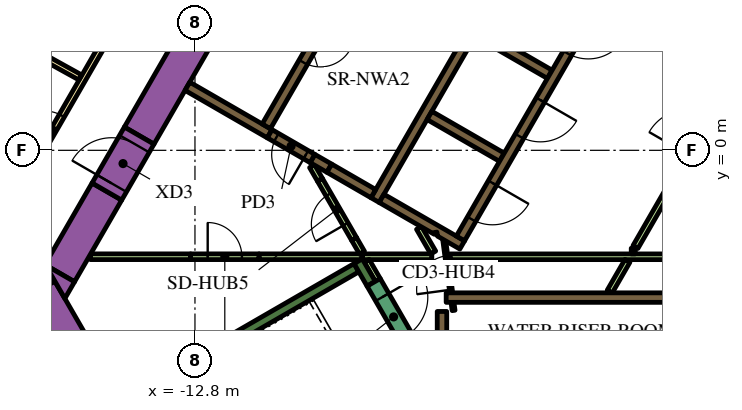
"""IFC4 building model, lengths in metres.
Left out: names, types, materials, properties, quantities, classifications, styles, units other than length and angle.
Written with IfcOpenShell. Run it as: python <this file> out.ifc"""

import sys

from ifc_helpers import new_model, si_unit, direction, frame, frame_2d, origin, place, context, subcontext, project, spatial, polyline, rectangle, outline, extrude, element, fill, save


model = new_model("IFC4")
c1 = context("Model", 3, precision=1e-05, world=origin(), true_north=direction((0.0, 1.0)))
c2 = subcontext(c1, "Body", "Model", "MODEL_VIEW")
j1 = project(units=[si_unit("LENGTHUNIT", "METRE"), si_unit("PLANEANGLEUNIT", "RADIAN")], contexts=[c1])
p1 = place(None, origin())
s1 = spatial("IfcSite", under=j1, at=p1, CompositionType="ELEMENT")
p2 = place(p1, origin())
s2 = spatial("IfcBuilding", under=s1, at=p2, CompositionType="ELEMENT")
p3 = place(p2, frame((0.0, 0.0, 62.7)))
s3 = spatial("IfcBuildingStorey", under=s2, at=p3, CompositionType="ELEMENT", Elevation=62.7)
p4 = place(p3, frame((-14.268, 0.387, 0.0), z_axis=(0.0, 0.0, 1.0), x_axis=(0.499994617707, 0.866028511231, 0.0)))
e1 = element("IfcWall", 1, at=p4, inside=s3, PredefinedType="SOLIDWALL", context=c2, shape_type="SweptSolid", body=[
    extrude(rectangle(XDim=18.817, YDim=0.9, at=frame_2d((9.409, 0.0))), origin(), (0.0, 0.0, 1.0), 3.9),
])
p5 = place(p3, frame((-12.134, -11.883, 0.0), z_axis=(0.0, 0.0, 1.0), x_axis=(-0.500005339912, 0.866022320763, 0.0)))
e2 = element("IfcWall", 2, at=p5, inside=s3, PredefinedType="SOLIDWALL", context=c2, shape_type="SweptSolid", body=[
    extrude(rectangle(XDim=9.488, YDim=0.9, at=frame_2d((4.744, 0.0))), origin(), (0.0, 0.0, 1.0), 3.9),
])
p6 = place(p3, origin())
e3 = element("IfcWall", 3, at=p6, inside=s3, PredefinedType="SOLIDWALL", context=c2, shape_type="SweptSolid", body=[
    extrude(outline(polyline([(-16.489, -3.44), (-17.251, -3.88), (-16.743, -3.0), (-16.489, -3.44)])), origin(), (0.0, 0.0, 1.0), 3.9),
])
p7 = place(p3, frame((-15.118, -1.085, 0.0), z_axis=(0.0, 0.0, 1.0), x_axis=(-0.50006606081, -0.865987260198, 0.0)))
e4 = element("IfcWall", 4, at=p7, inside=s3, PredefinedType="SOLIDWALL", context=c2, shape_type="SweptSolid", body=[
    extrude(rectangle(XDim=2.481, YDim=0.9, at=frame_2d((1.24, 0.0))), origin(), (0.0, 0.0, 1.0), 3.9),
])
e5 = element("IfcWall", 5, at=p6, inside=s3, PredefinedType="SOLIDWALL", context=c2, shape_type="SweptSolid", body=[
    extrude(outline(polyline([(-16.223, -3.9), (-16.732, -3.02), (-15.969, -3.46), (-16.223, -3.9)])), origin(), (0.0, 0.0, 1.0), 3.9),
])
p8 = place(p3, frame((-14.44, -6.49, 0.0), z_axis=(0.0, 0.0, 1.0), x_axis=(0.866022966069, 0.500004222222, 0.0)))
e6 = element("IfcWall", 6, at=p8, inside=s3, PredefinedType="SOLIDWALL", context=c2, shape_type="SweptSolid", body=[
    extrude(rectangle(XDim=6.8, YDim=0.25, at=frame_2d((3.4, 0.0))), origin(), (0.0, 0.0, 1.0), 3.9),
])
p9 = place(p3, frame((-8.163, -3.511, 0.0), z_axis=(0.0, 0.0, 1.0), x_axis=(-0.500206266495, 0.865906283012, 0.0)))
e7 = element("IfcWall", 7, at=p9, inside=s3, PredefinedType="SOLIDWALL", context=c2, shape_type="SweptSolid", body=[
    extrude(rectangle(XDim=0.684, YDim=0.25, at=frame_2d((0.342, 0.0))), origin(), (0.0, 0.0, 1.0), 3.9),
])
p10 = place(p3, frame((-6.3, -4.24, 0.0), z_axis=(0.0, 0.0, 1.0), x_axis=(0.0, -1.0, 0.0)))
e8 = element("IfcWall", 8, at=p10, inside=s3, PredefinedType="SOLIDWALL", context=c2, shape_type="SweptSolid", body=[
    extrude(rectangle(XDim=2.914, YDim=0.25, at=frame_2d((1.457, 0.0))), origin(), (0.0, 0.0, 1.0), 3.9),
])
p11 = place(p3, frame((-6.19, -3.875, 0.0), z_axis=(0.0, 0.0, 1.0), x_axis=(1.0, 0.0, 0.0)))
e9 = element("IfcWall", 9, at=p11, inside=s3, PredefinedType="SOLIDWALL", context=c2, shape_type="SweptSolid", body=[
    extrude(rectangle(XDim=12.615, YDim=0.25, at=frame_2d((6.307, 0.0))), origin(), (0.0, 0.0, 1.0), 3.9),
])
p12 = place(p3, frame((-8.06, -1.311, 0.0), z_axis=(0.0, 0.0, 1.0), x_axis=(0.50000273126, 0.866023826885, 0.0)))
e10 = element("IfcWall", 10, at=p12, inside=s3, PredefinedType="SOLIDWALL", context=c2, shape_type="SweptSolid", body=[
    extrude(rectangle(XDim=10.33, YDim=0.25, at=frame_2d((5.165, 0.0))), origin(), (0.0, 0.0, 1.0), 3.9),
])
for number, where, z_axis, x_axis in (
    (11, (-5.369, 3.1, 0.0), (0.0, 0.0, 1.0), (0.866, -0.5, 0.0)),
    (12, (-4.724, -0.182, 0.0), (0.0, 0.0, 1.0), (-0.866, 0.5, 0.0)),
):
    element("IfcWall", number, at=place(p3, frame(where, z_axis=z_axis, x_axis=x_axis)), inside=s3, PredefinedType="SOLIDWALL", context=c2, shape_type="SweptSolid", body=[
        extrude(rectangle(XDim=2.2, YDim=0.25, at=frame_2d((1.1, 0.0))), origin(), (0.0, 0.0, 1.0), 3.9),
    ])
e13 = element("IfcWall", 13, at=p6, inside=s3, PredefinedType="SOLIDWALL", context=c2, shape_type="SweptSolid", body=[
    extrude(outline(polyline([(-5.922, -2.257), (-5.922, -2.257), (-5.705, -2.382), (-5.83, -2.598), (-6.418, -2.258), (-6.433, -2.153), (-6.433, -2.153), (-6.433, -2.153), (-6.508, -2.163), (-6.508, -2.163), (-6.508, -2.163), (-6.501, -2.21), (-7.952, -1.373), (-7.827, -1.156), (-5.922, -2.257)])), origin(), (0.0, 0.0, 1.0), 3.9),
])
p13 = place(p3, frame((-9.708, -0.215, 0.0), z_axis=(0.0, 0.0, 1.0), x_axis=(0.866113839764, -0.499846793097, 0.0)))
e14 = element("IfcWall", 14, at=p13, inside=s3, PredefinedType="SOLIDWALL", context=c2, shape_type="SweptSolid", body=[
    extrude(rectangle(XDim=0.51, YDim=0.25, at=frame_2d((0.255, 0.0))), origin(), (0.0, 0.0, 1.0), 3.9),
])
p14 = place(p3, frame((-12.999, 1.685, 0.0), z_axis=(0.0, 0.0, 1.0), x_axis=(0.865996765544, -0.500049599607, 0.0)))
e15 = element("IfcWall", 15, at=p14, inside=s3, PredefinedType="SOLIDWALL", context=c2, shape_type="SweptSolid", body=[
    extrude(rectangle(XDim=2.498, YDim=0.25, at=frame_2d((1.249, 0.0))), origin(), (0.0, 0.0, 1.0), 3.9),
])
p15 = place(p3, frame((-9.265, -0.471, 0.0), z_axis=(0.0, 0.0, 1.0), x_axis=(0.865954634268, -0.500122556369, 0.0)))
e16 = element("IfcWall", 16, at=p15, inside=s3, PredefinedType="SOLIDWALL", context=c2, shape_type="SweptSolid", body=[
    extrude(rectangle(XDim=1.338, YDim=0.25, at=frame_2d((0.669, 0.0))), origin(), (0.0, 0.0, 1.0), 3.9),
])
p16 = place(p3, frame((-12.915, -2.8, 0.0), z_axis=(0.0, 0.0, 1.0), x_axis=(-1.0, 0.0, 0.0)))
e17 = element("IfcWall", 17, at=p16, inside=s3, PredefinedType="PARTITIONING", context=c2, shape_type="SweptSolid", body=[
    extrude(rectangle(XDim=2.637, YDim=0.15, at=frame_2d((1.318, 0.0))), origin(), (0.0, 0.0, 1.0), 2.75),
])
p17 = place(p3, frame((-8.395, -2.8, 0.0), z_axis=(0.0, 0.0, 1.0), x_axis=(1.0, 0.0, 0.0)))
e18 = element("IfcWall", 18, at=p17, inside=s3, PredefinedType="PARTITIONING", context=c2, shape_type="SweptSolid", body=[
    extrude(rectangle(XDim=1.828, YDim=0.15, at=frame_2d((0.914, 0.0))), origin(), (0.0, 0.0, 1.0), 2.75),
])
p18 = place(p3, frame((-11.115, -2.8, 0.0), z_axis=(0.0, 0.0, 1.0), x_axis=(1.0, 0.0, 0.0)))
e19 = element("IfcWall", 19, at=p18, inside=s3, PredefinedType="PARTITIONING", context=c2, shape_type="SweptSolid", body=[
    extrude(rectangle(XDim=2.708, YDim=0.15, at=frame_2d((1.354, 0.0))), origin(), (0.0, 0.0, 1.0), 2.75),
])
p19 = place(p3, frame((-6.531, -2.689, 0.0), z_axis=(0.0, 0.0, 1.0), x_axis=(-0.499967446111, 0.866044197965, 0.0)))
e20 = element("IfcWall", 20, at=p19, inside=s3, PredefinedType="PARTITIONING", context=c2, shape_type="SweptSolid", body=[
    extrude(rectangle(XDim=0.748, YDim=0.15, at=frame_2d((0.374, 0.0))), origin(), (0.0, 0.0, 1.0), 2.75),
])
p20 = place(p3, frame((-7.99, -3.412, 0.0), z_axis=(0.0, 0.0, 1.0), x_axis=(-0.500193841991, 0.86591346013, 0.0)))
e21 = element("IfcWall", 21, at=p20, inside=s3, PredefinedType="PARTITIONING", context=c2, shape_type="SweptSolid", body=[
    extrude(rectangle(XDim=0.583, YDim=0.15, at=frame_2d((0.292, 0.0))), origin(), (0.0, 0.0, 1.0), 2.75),
])
p21 = place(p3, frame((-8.612, -2.333, 0.0), z_axis=(0.0, 0.0, 1.0), x_axis=(0.500248216681, -0.86588204838, 0.0)))
e22 = element("IfcWall", 22, at=p21, inside=s3, PredefinedType="PARTITIONING", context=c2, shape_type="SweptSolid", body=[
    extrude(rectangle(XDim=0.415, YDim=0.15, at=frame_2d((0.208, 0.0))), origin(), (0.0, 0.0, 1.0), 2.75),
])
p22 = place(p3, frame((-6.086, -2.801, 0.0), z_axis=(0.0, 0.0, 1.0), x_axis=(1.0, 0.0, 0.0)))
e23 = element("IfcWall", 23, at=p22, inside=s3, PredefinedType="PARTITIONING", context=c2, shape_type="SweptSolid", body=[
    extrude(rectangle(XDim=7.524, YDim=0.15, at=frame_2d((3.762, 0.0))), origin(), (0.0, 0.0, 1.0), 2.75),
])
p23 = place(p3, frame((-1.887, -3.718, 0.0), z_axis=(0.0, 0.0, 1.0), x_axis=(0.499842898591, 0.866116087328, 0.0)))
e24 = element("IfcWall", 24, at=p23, inside=s3, PredefinedType="PARTITIONING", context=c2, shape_type="SweptSolid", body=[
    extrude(rectangle(XDim=0.936, YDim=0.15, at=frame_2d((0.468, 0.0))), origin(), (0.0, 0.0, 1.0), 2.75),
])
p24 = place(p3, frame((-1.212, -2.651, 0.0), z_axis=(0.0, 0.0, 1.0), x_axis=(-1.0, 0.0, 0.0)))
e25 = element("IfcWall", 25, at=p24, inside=s3, PredefinedType="PARTITIONING", context=c2, shape_type="SweptSolid", body=[
    extrude(rectangle(XDim=0.108, YDim=0.15, at=frame_2d((0.054, 0.0))), origin(), (0.0, 0.0, 1.0), 2.75),
])
p25 = place(p3, frame((-1.208, -2.544, 0.0), z_axis=(0.0, 0.0, 1.0), x_axis=(0.499995339376, 0.86602809458, 0.0)))
e26 = element("IfcWall", 26, at=p25, inside=s3, PredefinedType="PARTITIONING", context=c2, shape_type="SweptSolid", body=[
    extrude(rectangle(XDim=2.349, YDim=0.15, at=frame_2d((1.175, 0.0))), origin(), (0.0, 0.0, 1.0), 2.75),
])
p26 = place(p3, frame((-9.512, -0.775, 0.0), z_axis=(0.0, 0.0, 1.0), x_axis=(-0.500080620599, 0.865978852456, 0.0)))
e27 = element("IfcWall", 27, at=p26, inside=s3, PredefinedType="PARTITIONING", context=c2, shape_type="SweptSolid", body=[
    extrude(rectangle(XDim=0.413, YDim=0.15, at=frame_2d((0.207, 0.0))), origin(), (0.0, 0.0, 1.0), 2.75),
])
p27 = place(p3, frame((-6.008, 9.144, 0.0), z_axis=(0.0, 0.0, 1.0), x_axis=(-0.500006956611, -0.866021387346, 0.0)))
e28 = element("IfcWall", 28, at=p27, inside=s3, PredefinedType="SOLIDWALL", context=c2, shape_type="SweptSolid", body=[
    extrude(rectangle(XDim=9.83, YDim=0.25, at=frame_2d((4.915, 0.0))), origin(), (0.0, 0.0, 1.0), 3.9),
])
p28 = place(p27, frame((6.985, 0.0, 0.0)))
e29 = element("IfcOpeningElement", 29, at=p28, cuts=e28, PredefinedType="OPENING", context=c2, shape_type="SweptSolid", body=[
    extrude(rectangle(XDim=0.9, YDim=2.1, at=frame_2d((0.45, 1.05))), frame((0.0, 0.135, 0.0), z_axis=(0.0, -1.0, 0.0), x_axis=(1.0, 0.0, 0.0)), (0.0, 0.0, 1.0), 0.27),
])
p29 = place(p3, frame((-0.898, 6.194, 0.0), z_axis=(0.0, 0.0, 1.0), x_axis=(-0.499996202215, -0.866027596426, 0.0)))
e30 = element("IfcWall", 30, at=p29, inside=s3, PredefinedType="SOLIDWALL", context=c2, shape_type="SweptSolid", body=[
    extrude(rectangle(XDim=9.83, YDim=0.25, at=frame_2d((4.915, 0.0))), origin(), (0.0, 0.0, 1.0), 3.9),
])
p30 = place(p29, frame((0.585, 0.0, 0.0)))
e31 = element("IfcOpeningElement", 31, at=p30, cuts=e30, PredefinedType="OPENING", context=c2, shape_type="SweptSolid", body=[
    extrude(rectangle(XDim=1.1, YDim=2.1, at=frame_2d((0.55, 1.05))), frame((0.0, 0.135, 0.0), z_axis=(0.0, -1.0, 0.0), x_axis=(1.0, 0.0, 0.0)), (0.0, 0.0, 1.0), 0.27),
])
p31 = place(p29, frame((3.105, 0.0, 0.0)))
e32 = element("IfcOpeningElement", 32, at=p31, cuts=e30, PredefinedType="OPENING", context=c2, shape_type="SweptSolid", body=[
    extrude(rectangle(XDim=1.1, YDim=2.1, at=frame_2d((0.55, 1.05))), frame((0.0, 0.135, 0.0), z_axis=(0.0, -1.0, 0.0), x_axis=(1.0, 0.0, 0.0)), (0.0, 0.0, 1.0), 0.27),
])
p32 = place(p29, frame((5.625, 0.0, 0.0)))
e33 = element("IfcOpeningElement", 33, at=p32, cuts=e30, PredefinedType="OPENING", context=c2, shape_type="SweptSolid", body=[
    extrude(rectangle(XDim=1.1, YDim=2.1, at=frame_2d((0.55, 1.05))), frame((0.0, 0.135, 0.0), z_axis=(0.0, -1.0, 0.0), x_axis=(1.0, 0.0, 0.0)), (0.0, 0.0, 1.0), 0.27),
])
p33 = place(p29, frame((8.145, 0.0, 0.0)))
e34 = element("IfcOpeningElement", 34, at=p33, cuts=e30, PredefinedType="OPENING", context=c2, shape_type="SweptSolid", body=[
    extrude(rectangle(XDim=1.1, YDim=2.1, at=frame_2d((0.55, 1.05))), frame((0.0, 0.135, 0.0), z_axis=(0.0, -1.0, 0.0), x_axis=(1.0, 0.0, 0.0)), (0.0, 0.0, 1.0), 0.27),
])
p34 = place(p3, frame((-8.098, -3.474, 0.0), z_axis=(0.0, 0.0, 1.0), x_axis=(0.49994051562, -0.866059744384, 0.0)))
e35 = element("IfcWall", 35, at=p34, inside=s3, PredefinedType="SOLIDWALL", context=c2, shape_type="SweptSolid", body=[
    extrude(rectangle(XDim=2.1, YDim=0.4, at=frame_2d((1.05, 0.0))), origin(), (0.0, 0.0, 1.0), 3.9),
])
p35 = place(p34, frame((0.45, 0.0, 0.0)))
e36 = element("IfcOpeningElement", 36, at=p35, cuts=e35, PredefinedType="OPENING", context=c2, shape_type="SweptSolid", body=[
    extrude(rectangle(XDim=1.2, YDim=2.1, at=frame_2d((0.6, 1.05))), frame((0.0, 0.21, 0.0), z_axis=(0.0, -1.0, 0.0), x_axis=(1.0, 0.0, 0.0)), (0.0, 0.0, 1.0), 0.42),
])
p36 = place(p3, frame((-9.708, -0.215, 0.0), z_axis=(0.0, 0.0, 1.0), x_axis=(-0.866004217611, 0.500036693733, 0.0)))
e37 = element("IfcWall", 37, at=p36, inside=s3, PredefinedType="SOLIDWALL", context=c2, shape_type="SweptSolid", body=[
    extrude(rectangle(XDim=1.3, YDim=0.25, at=frame_2d((0.65, 0.0))), origin(), (0.0, 0.0, 1.0), 3.9),
])
p37 = place(p36, frame((0.2, 0.0, 0.0)))
e38 = element("IfcOpeningElement", 38, at=p37, cuts=e37, PredefinedType="OPENING", context=c2, shape_type="SweptSolid", body=[
    extrude(rectangle(XDim=0.9, YDim=2.1, at=frame_2d((0.45, 1.05))), frame((0.0, 0.135, 0.0), z_axis=(0.0, -1.0, 0.0), x_axis=(1.0, 0.0, 0.0)), (0.0, 0.0, 1.0), 0.27),
])
p38 = place(p3, frame((-5.995, -4.213, 0.0), z_axis=(0.0, 0.0, 1.0), x_axis=(-0.132072335448, 0.991240081014, 0.0)))
e39 = element("IfcWall", 39, at=p38, inside=s3, PredefinedType="PARTITIONING", context=c2, shape_type="SweptSolid", body=[
    extrude(rectangle(XDim=2.1, YDim=0.076, at=frame_2d((1.05, 0.0))), origin(), (0.0, 0.0, 1.0), 2.75),
])
p39 = place(p38, frame((0.55, 0.0, 0.0)))
e40 = element("IfcOpeningElement", 40, at=p39, cuts=e39, PredefinedType="OPENING", context=c2, shape_type="SweptSolid", body=[
    extrude(rectangle(XDim=0.9, YDim=2.1, at=frame_2d((0.45, 1.05))), frame((0.0, 0.048, 0.0), z_axis=(0.0, -1.0, 0.0), x_axis=(1.0, 0.0, 0.0)), (0.0, 0.0, 1.0), 0.096),
])
p40 = place(p3, frame((-15.118, -1.085, 0.0), z_axis=(0.0, 0.0, 1.0), x_axis=(0.500000056704, 0.866025371046, 0.0)))
e41 = element("IfcWall", 41, at=p40, inside=s3, PredefinedType="SOLIDWALL", context=c2, shape_type="SweptSolid", body=[
    extrude(rectangle(XDim=1.7, YDim=0.9, at=frame_2d((0.85, 0.0))), origin(), (0.0, 0.0, 1.0), 3.9),
])
p41 = place(p40, frame((0.25, 0.0, 0.0)))
e42 = element("IfcOpeningElement", 42, at=p41, cuts=e41, PredefinedType="OPENING", context=c2, shape_type="SweptSolid", body=[
    extrude(rectangle(XDim=1.2, YDim=2.1, at=frame_2d((0.6, 1.05))), frame((0.0, 0.46, 0.0), z_axis=(0.0, -1.0, 0.0), x_axis=(1.0, 0.0, 0.0)), (0.0, 0.0, 1.0), 0.92),
])
p42 = place(p3, frame((-12.915, -2.8, 0.0), z_axis=(0.0, 0.0, 1.0), x_axis=(1.0, 0.0, 0.0)))
e43 = element("IfcWall", 43, at=p42, inside=s3, PredefinedType="PARTITIONING", context=c2, shape_type="SweptSolid", body=[
    extrude(rectangle(XDim=1.8, YDim=0.15, at=frame_2d((0.9, 0.0))), origin(), (0.0, 0.0, 1.0), 2.75),
])
p43 = place(p42, frame((0.45, 0.0, 0.0)))
e44 = element("IfcOpeningElement", 44, at=p43, cuts=e43, PredefinedType="OPENING", context=c2, shape_type="SweptSolid", body=[
    extrude(rectangle(XDim=0.9, YDim=2.1, at=frame_2d((0.45, 1.05))), frame((0.0, 0.085, 0.0), z_axis=(0.0, -1.0, 0.0), x_axis=(1.0, 0.0, 0.0)), (0.0, 0.0, 1.0), 0.17),
])
p44 = place(p3, frame((-8.612, -2.333, 0.0), z_axis=(0.0, 0.0, 1.0), x_axis=(-0.499961193289, 0.866047807691, 0.0)))
e45 = element("IfcWall", 45, at=p44, inside=s3, PredefinedType="PARTITIONING", context=c2, shape_type="SweptSolid", body=[
    extrude(rectangle(XDim=1.8, YDim=0.15, at=frame_2d((0.9, 0.0))), origin(), (0.0, 0.0, 1.0), 2.75),
])
p45 = place(p44, frame((0.45, 0.0, 0.0)))
e46 = element("IfcOpeningElement", 46, at=p45, cuts=e45, PredefinedType="OPENING", context=c2, shape_type="SweptSolid", body=[
    extrude(rectangle(XDim=0.9, YDim=2.1, at=frame_2d((0.45, 1.05))), frame((0.0, 0.085, 0.0), z_axis=(0.0, -1.0, 0.0), x_axis=(1.0, 0.0, 0.0)), (0.0, 0.0, 1.0), 0.17),
])
p46 = place(p3, frame((-19.081, -3.9, 0.0), z_axis=(0.0, 0.0, 1.0), x_axis=(0.499998313975, 0.866026377209, 0.0)))
e47 = element("IfcWall", 47, at=p46, inside=s3, PredefinedType="PARTITIONING", context=c2, shape_type="SweptSolid", body=[
    extrude(rectangle(XDim=25.766, YDim=0.15, at=frame_2d((12.883, 0.0))), origin(), (0.0, 0.0, 1.0), 2.75),
])
p47 = place(p46, frame((24.586, 0.0, 0.0)))
e48 = element("IfcOpeningElement", 48, at=p47, cuts=e47, PredefinedType="OPENING", context=c2, shape_type="SweptSolid", body=[
    extrude(rectangle(XDim=1.0, YDim=2.1, at=frame_2d((0.5, 1.05))), frame((0.0, 0.085, 0.0), z_axis=(0.0, -1.0, 0.0), x_axis=(1.0, 0.0, 0.0)), (0.0, 0.0, 1.0), 0.17),
])
p48 = place(p46, frame((9.948, 0.0, 0.0)))
e49 = element("IfcOpeningElement", 49, at=p48, cuts=e47, PredefinedType="OPENING", context=c2, shape_type="SweptSolid", body=[
    extrude(rectangle(XDim=1.0, YDim=2.1, at=frame_2d((0.5, 1.05))), frame((0.0, 0.085, 0.0), z_axis=(0.0, -1.0, 0.0), x_axis=(1.0, 0.0, 0.0)), (0.0, 0.0, 1.0), 0.17),
])
p49 = place(p46, frame((7.782, 0.0, 0.0)))
e50 = element("IfcOpeningElement", 50, at=p49, cuts=e47, PredefinedType="OPENING", context=c2, shape_type="SweptSolid", body=[
    extrude(rectangle(XDim=0.9, YDim=2.1, at=frame_2d((0.45, 1.05))), frame((0.0, 0.085, 0.0), z_axis=(0.0, -1.0, 0.0), x_axis=(1.0, 0.0, 0.0)), (0.0, 0.0, 1.0), 0.17),
])
p50 = place(p46, frame((4.658, 0.0, 0.0)))
e51 = element("IfcOpeningElement", 51, at=p50, cuts=e47, PredefinedType="OPENING", context=c2, shape_type="SweptSolid", body=[
    extrude(rectangle(XDim=0.9, YDim=2.1, at=frame_2d((0.45, 1.05))), frame((0.0, 0.085, 0.0), z_axis=(0.0, -1.0, 0.0), x_axis=(1.0, 0.0, 0.0)), (0.0, 0.0, 1.0), 0.17),
])
p51 = place(p3, frame((-16.412, -8.523, 0.0), z_axis=(0.0, 0.0, 1.0), x_axis=(-0.500001929737, 0.866024289647, 0.0)))
e52 = element("IfcWall", 52, at=p51, inside=s3, PredefinedType="PARTITIONING", context=c2, shape_type="SweptSolid", body=[
    extrude(rectangle(XDim=5.268, YDim=0.15, at=frame_2d((2.634, 0.0))), origin(), (0.0, 0.0, 1.0), 2.75),
])
p52 = place(p51, frame((4.088, 0.0, 0.0)))
e53 = element("IfcOpeningElement", 53, at=p52, cuts=e52, PredefinedType="OPENING", context=c2, shape_type="SweptSolid", body=[
    extrude(rectangle(XDim=1.0, YDim=2.1, at=frame_2d((0.5, 1.05))), frame((0.0, 0.085, 0.0), z_axis=(0.0, -1.0, 0.0), x_axis=(1.0, 0.0, 0.0)), (0.0, 0.0, 1.0), 0.17),
])
p53 = place(p3, frame((-23.132, 5.962, 0.0), z_axis=(0.0, 0.0, 1.0), x_axis=(0.875121716713, -0.483902863121, 0.0)))
e54 = element("IfcWall", 54, at=p53, inside=s3, PredefinedType="PARTITIONING", context=c2, shape_type="SweptSolid", body=[
    extrude(rectangle(XDim=8.355, YDim=0.15, at=frame_2d((4.178, 0.0))), origin(), (0.0, 0.0, 1.0), 2.75),
])
p54 = place(p28, origin())
e55 = element("IfcDoor", 55, at=p54, inside=s3, OperationType="SINGLE_SWING_LEFT", PredefinedType="DOOR", context=c2, shape_type="SweptSolid", body=[
    extrude(rectangle(XDim=0.9, YDim=2.1, at=frame_2d((0.45, 1.05))), frame((0.0, 0.025, 0.0), z_axis=(0.0, -1.0, 0.0), x_axis=(1.0, 0.0, 0.0)), (0.0, 0.0, 1.0), 0.05),
])
fill(e29, e55)
p55 = place(p31, origin())
e56 = element("IfcDoor", 56, at=p55, inside=s3, OperationType="DOUBLE_DOOR_SLIDING", PredefinedType="DOOR", context=c2, shape_type="SweptSolid", body=[
    extrude(rectangle(XDim=1.1, YDim=2.1, at=frame_2d((0.55, 1.05))), frame((0.0, 0.025, 0.0), z_axis=(0.0, -1.0, 0.0), x_axis=(1.0, 0.0, 0.0)), (0.0, 0.0, 1.0), 0.05),
])
fill(e32, e56)
p56 = place(p32, origin())
e57 = element("IfcDoor", 57, at=p56, inside=s3, OperationType="DOUBLE_DOOR_SLIDING", PredefinedType="DOOR", context=c2, shape_type="SweptSolid", body=[
    extrude(rectangle(XDim=1.1, YDim=2.1, at=frame_2d((0.55, 1.05))), frame((0.0, 0.025, 0.0), z_axis=(0.0, -1.0, 0.0), x_axis=(1.0, 0.0, 0.0)), (0.0, 0.0, 1.0), 0.05),
])
fill(e33, e57)
p57 = place(p33, origin())
e58 = element("IfcDoor", 58, at=p57, inside=s3, OperationType="DOUBLE_DOOR_SLIDING", PredefinedType="DOOR", context=c2, shape_type="SweptSolid", body=[
    extrude(rectangle(XDim=1.1, YDim=2.1, at=frame_2d((0.55, 1.05))), frame((0.0, 0.025, 0.0), z_axis=(0.0, -1.0, 0.0), x_axis=(1.0, 0.0, 0.0)), (0.0, 0.0, 1.0), 0.05),
])
fill(e34, e58)
p58 = place(p35, origin())
e59 = element("IfcDoor", 59, at=p58, inside=s3, OperationType="SINGLE_SWING_LEFT", PredefinedType="DOOR", context=c2, shape_type="SweptSolid", body=[
    extrude(rectangle(XDim=1.2, YDim=2.1, at=frame_2d((0.6, 1.05))), frame((0.0, 0.025, 0.0), z_axis=(0.0, -1.0, 0.0), x_axis=(1.0, 0.0, 0.0)), (0.0, 0.0, 1.0), 0.05),
])
fill(e36, e59)
p59 = place(p37, origin())
e60 = element("IfcDoor", 60, at=p59, inside=s3, OperationType="SINGLE_SWING_LEFT", PredefinedType="DOOR", context=c2, shape_type="SweptSolid", body=[
    extrude(rectangle(XDim=0.9, YDim=2.1, at=frame_2d((0.45, 1.05))), frame((0.0, 0.025, 0.0), z_axis=(0.0, -1.0, 0.0), x_axis=(1.0, 0.0, 0.0)), (0.0, 0.0, 1.0), 0.05),
])
fill(e38, e60)
p60 = place(p39, origin())
e61 = element("IfcDoor", 61, at=p60, inside=s3, OperationType="SINGLE_SWING_LEFT", PredefinedType="DOOR", context=c2, shape_type="SweptSolid", body=[
    extrude(rectangle(XDim=0.9, YDim=2.1, at=frame_2d((0.45, 1.05))), frame((0.0, 0.025, 0.0), z_axis=(0.0, -1.0, 0.0), x_axis=(1.0, 0.0, 0.0)), (0.0, 0.0, 1.0), 0.05),
])
fill(e40, e61)
p61 = place(p41, origin())
e62 = element("IfcDoor", 62, at=p61, inside=s3, OperationType="SINGLE_SWING_LEFT", PredefinedType="DOOR", context=c2, shape_type="SweptSolid", body=[
    extrude(rectangle(XDim=1.2, YDim=2.1, at=frame_2d((0.6, 1.05))), frame((0.0, 0.025, 0.0), z_axis=(0.0, -1.0, 0.0), x_axis=(1.0, 0.0, 0.0)), (0.0, 0.0, 1.0), 0.05),
])
fill(e42, e62)
p62 = place(p43, origin())
e63 = element("IfcDoor", 63, at=p62, inside=s3, OperationType="SINGLE_SWING_LEFT", PredefinedType="DOOR", context=c2, shape_type="SweptSolid", body=[
    extrude(rectangle(XDim=0.9, YDim=2.1, at=frame_2d((0.45, 1.05))), frame((0.0, 0.025, 0.0), z_axis=(0.0, -1.0, 0.0), x_axis=(1.0, 0.0, 0.0)), (0.0, 0.0, 1.0), 0.05),
])
fill(e44, e63)
p63 = place(p45, origin())
e64 = element("IfcDoor", 64, at=p63, inside=s3, OperationType="SINGLE_SWING_LEFT", PredefinedType="DOOR", context=c2, shape_type="SweptSolid", body=[
    extrude(rectangle(XDim=0.9, YDim=2.1, at=frame_2d((0.45, 1.05))), frame((0.0, 0.025, 0.0), z_axis=(0.0, -1.0, 0.0), x_axis=(1.0, 0.0, 0.0)), (0.0, 0.0, 1.0), 0.05),
])
fill(e46, e64)
p64 = place(p50, origin())
e65 = element("IfcDoor", 65, at=p64, inside=s3, OperationType="SINGLE_SWING_LEFT", PredefinedType="DOOR", context=c2, shape_type="SweptSolid", body=[
    extrude(rectangle(XDim=0.9, YDim=2.1, at=frame_2d((0.45, 1.05))), frame((0.0, 0.025, 0.0), z_axis=(0.0, -1.0, 0.0), x_axis=(1.0, 0.0, 0.0)), (0.0, 0.0, 1.0), 0.05),
])
fill(e51, e65)
save(model, sys.argv[1])
